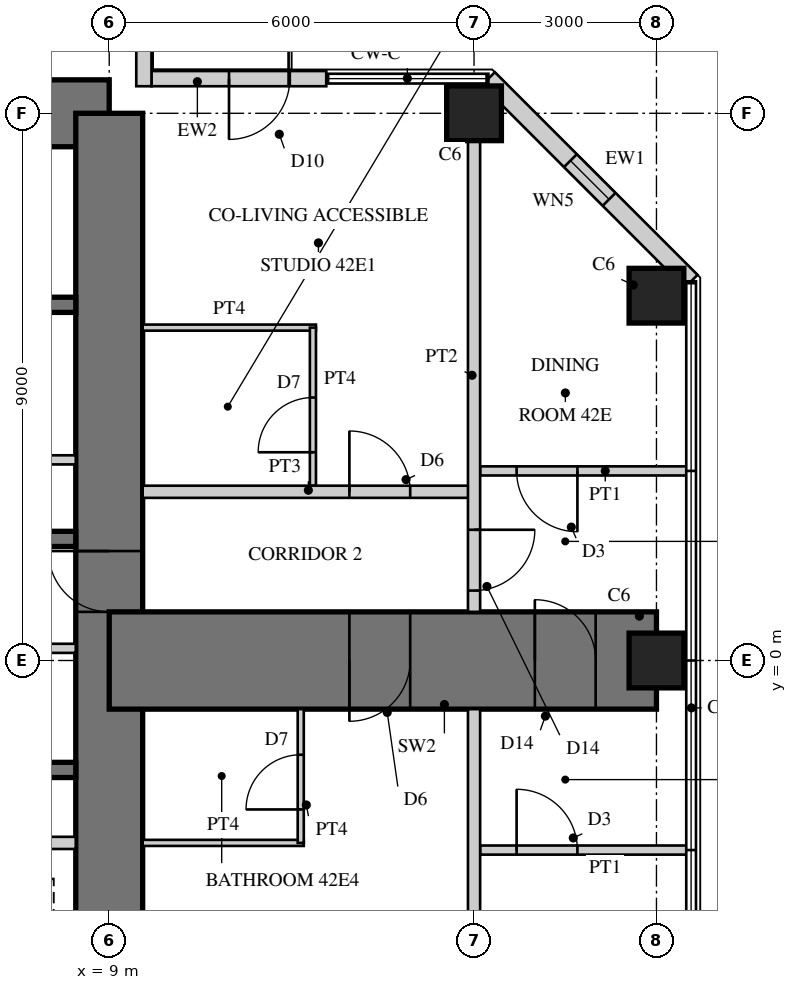
"""IFC4 building model, lengths in metres.
Left out: names, types, materials, properties, quantities, classifications, styles, units other than length and angle.
Written with IfcOpenShell. Run it as: python <this file> out.ifc"""

import sys

from ifc_helpers import new_model, si_unit, direction, frame, frame_2d, origin, origin_2d, place, context, subcontext, project, spatial, rectangle, hollow_rectangle, extrude, element, fill, save


model = new_model("IFC4")
c1 = context("Model", 3, precision=1e-05, world=origin(), true_north=direction((0.0, 1.0)))
c2 = subcontext(c1, "Body", "Model", "MODEL_VIEW")
j1 = project(units=[si_unit("LENGTHUNIT", "METRE"), si_unit("PLANEANGLEUNIT", "RADIAN")], contexts=[c1])
p1 = place(None, origin())
s1 = spatial("IfcSite", under=j1, at=p1, CompositionType="ELEMENT")
p2 = place(p1, origin())
s2 = spatial("IfcBuilding", under=s1, at=p2, CompositionType="ELEMENT")
p3 = place(p2, frame((0.0, 0.0, 172.9)))
s3 = spatial("IfcBuildingStorey", under=s2, at=p3, CompositionType="ELEMENT", Elevation=172.9)
p4 = place(p3, frame((9.0, 9.0, 0.0), z_axis=(0.0, 0.0, 1.0), x_axis=(-1.0, 0.0, 0.0)))
e1 = element("IfcWall", 1, at=p4, inside=s3, PredefinedType="SHEAR", context=c2, shape_type="SweptSolid", body=[
    extrude(rectangle(XDim=18.0, YDim=1.1, at=frame_2d((9.0, 0.0))), origin(), (0.0, 0.0, 1.0), 3.4),
])
p5 = place(p4, frame((9.8, 0.0, 0.0)))
e2 = element("IfcOpeningElement", 2, at=p5, cuts=e1, PredefinedType="OPENING", context=c2, shape_type="SweptSolid", body=[
    extrude(rectangle(XDim=1.0, YDim=2.4, at=frame_2d((0.5, 1.2))), frame((0.0, 0.56, 0.0), z_axis=(0.0, -1.0, 0.0), x_axis=(1.0, 0.0, 0.0)), (0.0, 0.0, 1.0), 1.12),
])
p6 = place(p3, frame((9.0, -9.0, 0.0), z_axis=(0.0, 0.0, 1.0), x_axis=(0.0, 1.0, 0.0)))
e3 = element("IfcWall", 3, at=p6, inside=s3, PredefinedType="SHEAR", context=c2, shape_type="SweptSolid", body=[
    extrude(rectangle(XDim=18.0, YDim=1.1, at=frame_2d((9.0, 0.0))), origin(), (0.0, 0.0, 1.0), 3.4),
])
p7 = place(p6, frame((9.8, 0.0, 0.0)))
e4 = element("IfcOpeningElement", 4, at=p7, cuts=e3, PredefinedType="OPENING", context=c2, shape_type="SweptSolid", body=[
    extrude(rectangle(XDim=1.0, YDim=2.4, at=frame_2d((0.5, 1.2))), frame((0.0, 0.56, 0.0), z_axis=(0.0, -1.0, 0.0), x_axis=(1.0, 0.0, 0.0)), (0.0, 0.0, 1.0), 1.12),
])
p8 = place(p3, frame((1.925, 2.0, 0.0), z_axis=(0.0, 0.0, 1.0), x_axis=(1.0, 0.0, 0.0)))
e5 = element("IfcWall", 5, at=p8, inside=s3, PredefinedType="SHEAR", context=c2, shape_type="SweptSolid", body=[
    extrude(rectangle(XDim=6.525, YDim=0.25, at=frame_2d((3.262, 0.0))), origin(), (0.0, 0.0, 1.0), 3.4),
])
p9 = place(p3, frame((1.925, 5.85, 0.0), z_axis=(0.0, 0.0, 1.0), x_axis=(1.0, 0.0, 0.0)))
e6 = element("IfcWall", 6, at=p9, inside=s3, PredefinedType="SHEAR", context=c2, shape_type="SweptSolid", body=[
    extrude(rectangle(XDim=6.525, YDim=0.25, at=frame_2d((3.262, 0.0))), origin(), (0.0, 0.0, 1.0), 3.4),
])
p10 = place(p9, frame((0.521, 0.0, 0.0)))
e7 = element("IfcOpeningElement", 7, at=p10, cuts=e6, PredefinedType="OPENING", context=c2, shape_type="SweptSolid", body=[
    extrude(rectangle(XDim=1.0, YDim=2.1, at=frame_2d((0.5, 1.05))), frame((0.0, 0.135, 0.0), z_axis=(0.0, -1.0, 0.0), x_axis=(1.0, 0.0, 0.0)), (0.0, 0.0, 1.0), 0.27),
])
p11 = place(p9, frame((2.762, 0.0, 0.0)))
e8 = element("IfcOpeningElement", 8, at=p11, cuts=e6, PredefinedType="OPENING", context=c2, shape_type="SweptSolid", body=[
    extrude(rectangle(XDim=1.0, YDim=2.1, at=frame_2d((0.5, 1.05))), frame((0.0, 0.135, 0.0), z_axis=(0.0, -1.0, 0.0), x_axis=(1.0, 0.0, 0.0)), (0.0, 0.0, 1.0), 0.27),
])
p12 = place(p3, frame((1.925, 3.3, 0.0), z_axis=(0.0, 0.0, 1.0), x_axis=(1.0, 0.0, 0.0)))
e9 = element("IfcWall", 9, at=p12, inside=s3, PredefinedType="PARTITIONING", context=c2, shape_type="SweptSolid", body=[
    extrude(rectangle(XDim=6.525, YDim=0.15, at=frame_2d((3.262, 0.0))), origin(), (0.0, 0.0, 1.0), 3.4),
])
p13 = place(p12, frame((0.075, 0.0, 0.0)))
e10 = element("IfcOpeningElement", 10, at=p13, cuts=e9, PredefinedType="OPENING", context=c2, shape_type="SweptSolid", body=[
    extrude(rectangle(XDim=0.8, YDim=2.1, at=frame_2d((0.4, 1.05))), frame((0.0, 0.085, 0.0), z_axis=(0.0, -1.0, 0.0), x_axis=(1.0, 0.0, 0.0)), (0.0, 0.0, 1.0), 0.17),
])
p14 = place(p12, frame((3.675, 0.0, 0.0)))
e11 = element("IfcOpeningElement", 11, at=p14, cuts=e9, PredefinedType="OPENING", context=c2, shape_type="SweptSolid", body=[
    extrude(rectangle(XDim=0.8, YDim=2.1, at=frame_2d((0.4, 1.05))), frame((0.0, 0.085, 0.0), z_axis=(0.0, -1.0, 0.0), x_axis=(1.0, 0.0, 0.0)), (0.0, 0.0, 1.0), 0.17),
])
p15 = place(p3, frame((2.125, -1.8, 0.0), z_axis=(0.0, 0.0, 1.0), x_axis=(1.0, 0.0, 0.0)))
e12 = element("IfcWall", 12, at=p15, inside=s3, PredefinedType="SHEAR", context=c2, shape_type="SweptSolid", body=[
    extrude(rectangle(XDim=6.325, YDim=0.25, at=frame_2d((3.163, 0.0))), origin(), (0.0, 0.0, 1.0), 3.4),
])
p16 = place(p3, frame((5.725, -3.0, 0.0), z_axis=(0.0, 0.0, 1.0), x_axis=(1.0, 0.0, 0.0)))
e13 = element("IfcWall", 13, at=p16, inside=s3, PredefinedType="PARTITIONING", context=c2, shape_type="SweptSolid", body=[
    extrude(rectangle(XDim=2.725, YDim=0.2, at=frame_2d((1.362, 0.0))), origin(), (0.0, 0.0, 1.0), 3.4),
])
p17 = place(p3, frame((9.0, 0.0, 0.0), z_axis=(0.0, 0.0, 1.0), x_axis=(1.0, 0.0, 0.0)))
e14 = element("IfcWall", 14, at=p17, inside=s3, PredefinedType="SHEAR", context=c2, shape_type="SweptSolid", body=[
    extrude(rectangle(XDim=9.0, YDim=1.6, at=frame_2d((4.5, 0.0))), origin(), (0.0, 0.0, 1.0), 3.4),
])
p18 = place(p17, frame((3.95, 0.0, 0.0)))
e15 = element("IfcOpeningElement", 15, at=p18, cuts=e14, PredefinedType="OPENING", context=c2, shape_type="SweptSolid", body=[
    extrude(rectangle(XDim=1.0, YDim=2.15, at=frame_2d((0.5, 1.075))), frame((0.0, 0.81, 0.0), z_axis=(0.0, -1.0, 0.0), x_axis=(1.0, 0.0, 0.0)), (0.0, 0.0, 1.0), 1.62),
])
p19 = place(p17, frame((7.0, 0.0, 0.0)))
e16 = element("IfcOpeningElement", 16, at=p19, cuts=e14, PredefinedType="OPENING", context=c2, shape_type="SweptSolid", body=[
    extrude(rectangle(XDim=1.0, YDim=2.2, at=frame_2d((0.5, 1.1))), frame((0.0, 0.81, 0.0), z_axis=(0.0, -1.0, 0.0), x_axis=(1.0, 0.0, 0.0)), (0.0, 0.0, 1.0), 1.62),
])
for number, where, z_axis, x_axis in (
    (17, (15.0, 9.0, 0.0), (0.0, 0.0, 1.0), (1.0, 0.0, 0.0)),
    (18, (18.0, 0.0, 0.0), (0.0, 0.0, 1.0), (1.0, 0.0, 0.0)),
    (19, (18.0, 6.0, 0.0), (0.0, 0.0, 1.0), (1.0, 0.0, 0.0)),
):
    element("IfcColumn", number, at=place(p3, frame(where, z_axis=z_axis, x_axis=x_axis)), inside=s3, PredefinedType="COLUMN", context=c2, shape_type="SweptSolid", body=[
        extrude(rectangle(XDim=0.9, YDim=0.9, at=origin_2d()), origin(), (0.0, 0.0, 1.0), 3.4),
    ])
p20 = place(p3, frame((18.57, 6.236, 0.0), z_axis=(0.0, 0.0, 1.0), x_axis=(-0.707106781187, 0.707106781187, 0.0)))
e20 = element("IfcWall", 20, at=p20, inside=s3, PredefinedType="SOLIDWALL", context=c2, shape_type="SweptSolid", body=[
    extrude(rectangle(XDim=4.715, YDim=0.3, at=frame_2d((2.357, 0.0))), origin(), (0.0, 0.0, 1.0), 3.22),
])
p21 = place(p20, frame((1.907, 0.0, 0.3)))
e21 = element("IfcOpeningElement", 21, at=p21, cuts=e20, PredefinedType="OPENING", context=c2, shape_type="SweptSolid", body=[
    extrude(rectangle(XDim=0.9, YDim=2.4, at=frame_2d((0.45, 1.2))), frame((0.0, 0.16, 0.0), z_axis=(0.0, -1.0, 0.0), x_axis=(1.0, 0.0, 0.0)), (0.0, 0.0, 1.0), 0.32),
])
p22 = place(p3, frame((12.57, 9.57, 0.0), z_axis=(0.0, 0.0, 1.0), x_axis=(-1.0, 0.0, 0.0)))
e22 = element("IfcWall", 22, at=p22, inside=s3, PredefinedType="SOLIDWALL", context=c2, shape_type="SweptSolid", body=[
    extrude(rectangle(XDim=2.875, YDim=0.25, at=frame_2d((1.438, 0.0))), origin(), (0.0, 0.0, 1.0), 3.22),
])
p23 = place(p22, frame((0.6, 0.0, 0.0)))
e23 = element("IfcOpeningElement", 23, at=p23, cuts=e22, PredefinedType="OPENING", context=c2, shape_type="SweptSolid", body=[
    extrude(rectangle(XDim=1.0, YDim=2.2, at=frame_2d((0.5, 1.1))), frame((0.0, 0.135, 0.0), z_axis=(0.0, -1.0, 0.0), x_axis=(1.0, 0.0, 0.0)), (0.0, 0.0, 1.0), 0.27),
])
p24 = place(p3, frame((9.57, 9.445, 0.0), z_axis=(0.0, 0.0, 1.0), x_axis=(0.0, 1.0, 0.0)))
e24 = element("IfcWall", 24, at=p24, inside=s3, PredefinedType="SOLIDWALL", context=c2, shape_type="SweptSolid", body=[
    extrude(rectangle(XDim=3.125, YDim=0.25, at=frame_2d((1.562, 0.0))), origin(), (0.0, 0.0, 1.0), 3.22),
])
p25 = place(p24, frame((0.6, 0.0, 0.0)))
e25 = element("IfcOpeningElement", 25, at=p25, cuts=e24, PredefinedType="OPENING", context=c2, shape_type="SweptSolid", body=[
    extrude(rectangle(XDim=1.0, YDim=2.2, at=frame_2d((0.5, 1.1))), frame((0.0, 0.135, 0.0), z_axis=(0.0, -1.0, 0.0), x_axis=(1.0, 0.0, 0.0)), (0.0, 0.0, 1.0), 0.27),
])
p26 = place(p3, frame((2.325, 0.2, 0.0), z_axis=(0.0, 0.0, 1.0), x_axis=(1.0, 0.0, 0.0)))
e26 = element("IfcWall", 26, at=p26, inside=s3, PredefinedType="PARTITIONING", context=c2, shape_type="SweptSolid", body=[
    extrude(rectangle(XDim=6.125, YDim=0.15, at=frame_2d((3.062, 0.0))), origin(), (0.0, 0.0, 1.0), 3.22),
])
p27 = place(p26, frame((0.4, 0.0, 0.0)))
e27 = element("IfcOpeningElement", 27, at=p27, cuts=e26, PredefinedType="OPENING", context=c2, shape_type="SweptSolid", body=[
    extrude(rectangle(XDim=1.0, YDim=2.1, at=frame_2d((0.5, 1.05))), frame((0.0, 0.085, 0.0), z_axis=(0.0, -1.0, 0.0), x_axis=(1.0, 0.0, 0.0)), (0.0, 0.0, 1.0), 0.17),
])
p28 = place(p3, frame((9.55, 5.475, 0.0), z_axis=(0.0, 0.0, 1.0), x_axis=(1.0, 0.0, 0.0)))
e28 = element("IfcWall", 28, at=p28, inside=s3, PredefinedType="PARTITIONING", context=c2, shape_type="SweptSolid", body=[
    extrude(rectangle(XDim=2.85, YDim=0.1, at=frame_2d((1.425, 0.0))), origin(), (0.0, 0.0, 1.0), 3.22),
])
p29 = place(p3, frame((12.35, 2.875, 0.0), z_axis=(0.0, 0.0, 1.0), x_axis=(0.0, 1.0, 0.0)))
e29 = element("IfcWall", 29, at=p29, inside=s3, PredefinedType="PARTITIONING", context=c2, shape_type="SweptSolid", body=[
    extrude(rectangle(XDim=2.6, YDim=0.1, at=frame_2d((1.3, 0.0))), origin(), (0.0, 0.0, 1.0), 3.22),
])
p30 = place(p29, frame((0.55, 0.0, 0.0)))
e30 = element("IfcOpeningElement", 30, at=p30, cuts=e29, PredefinedType="OPENING", context=c2, shape_type="SweptSolid", body=[
    extrude(rectangle(XDim=0.9, YDim=2.1, at=frame_2d((0.45, 1.05))), frame((0.0, 0.06, 0.0), z_axis=(0.0, -1.0, 0.0), x_axis=(1.0, 0.0, 0.0)), (0.0, 0.0, 1.0), 0.12),
])
p31 = place(p3, frame((9.55, -3.0, 0.0), z_axis=(0.0, 0.0, 1.0), x_axis=(1.0, 0.0, 0.0)))
e31 = element("IfcWall", 31, at=p31, inside=s3, PredefinedType="PARTITIONING", context=c2, shape_type="SweptSolid", body=[
    extrude(rectangle(XDim=2.65, YDim=0.1, at=frame_2d((1.325, 0.0))), origin(), (0.0, 0.0, 1.0), 3.22),
])
p32 = place(p3, frame((12.15, -3.0, 0.0), z_axis=(0.0, 0.0, 1.0), x_axis=(0.0, 1.0, 0.0)))
e32 = element("IfcWall", 32, at=p32, inside=s3, PredefinedType="PARTITIONING", context=c2, shape_type="SweptSolid", body=[
    extrude(rectangle(XDim=2.2, YDim=0.1, at=frame_2d((1.1, 0.0))), origin(), (0.0, 0.0, 1.0), 3.22),
])
p33 = place(p32, frame((0.55, 0.0, 0.0)))
e33 = element("IfcOpeningElement", 33, at=p33, cuts=e32, PredefinedType="OPENING", context=c2, shape_type="SweptSolid", body=[
    extrude(rectangle(XDim=0.9, YDim=2.1, at=frame_2d((0.45, 1.05))), frame((0.0, 0.06, 0.0), z_axis=(0.0, -1.0, 0.0), x_axis=(1.0, 0.0, 0.0)), (0.0, 0.0, 1.0), 0.12),
])
p34 = place(p3, frame((9.55, 2.775, 0.0), z_axis=(0.0, 0.0, 1.0), x_axis=(1.0, 0.0, 0.0)))
e34 = element("IfcWall", 34, at=p34, inside=s3, PredefinedType="SOLIDWALL", context=c2, shape_type="SweptSolid", body=[
    extrude(rectangle(XDim=5.45, YDim=0.2, at=frame_2d((2.725, 0.0))), origin(), (0.0, 0.0, 1.0), 3.22),
])
p35 = place(p34, frame((3.4, 0.0, 0.0)))
e35 = element("IfcOpeningElement", 35, at=p35, cuts=e34, PredefinedType="OPENING", context=c2, shape_type="SweptSolid", body=[
    extrude(rectangle(XDim=1.0, YDim=2.15, at=frame_2d((0.5, 1.075))), frame((0.0, 0.11, 0.0), z_axis=(0.0, -1.0, 0.0), x_axis=(1.0, 0.0, 0.0)), (0.0, 0.0, 1.0), 0.22),
])
p36 = place(p3, frame((15.1, 3.118, 0.0), z_axis=(0.0, 0.0, 1.0), x_axis=(1.0, 0.0, 0.0)))
e36 = element("IfcWall", 36, at=p36, inside=s3, PredefinedType="PARTITIONING", context=c2, shape_type="SweptSolid", body=[
    extrude(rectangle(XDim=3.43, YDim=0.15, at=frame_2d((1.715, 0.0))), origin(), (0.0, 0.0, 1.0), 3.22),
])
p37 = place(p36, frame((0.6, 0.0, 0.0)))
e37 = element("IfcOpeningElement", 37, at=p37, cuts=e36, PredefinedType="OPENING", context=c2, shape_type="SweptSolid", body=[
    extrude(rectangle(XDim=1.0, YDim=2.1, at=frame_2d((0.5, 1.05))), frame((0.0, 0.085, 0.0), z_axis=(0.0, -1.0, 0.0), x_axis=(1.0, 0.0, 0.0)), (0.0, 0.0, 1.0), 0.17),
])
p38 = place(p3, frame((15.1, -3.118, 0.0), z_axis=(0.0, 0.0, 1.0), x_axis=(1.0, 0.0, 0.0)))
e38 = element("IfcWall", 38, at=p38, inside=s3, PredefinedType="PARTITIONING", context=c2, shape_type="SweptSolid", body=[
    extrude(rectangle(XDim=3.43, YDim=0.15, at=frame_2d((1.715, 0.0))), origin(), (0.0, 0.0, 1.0), 3.22),
])
p39 = place(p38, frame((0.6, 0.0, 0.0)))
e39 = element("IfcOpeningElement", 39, at=p39, cuts=e38, PredefinedType="OPENING", context=c2, shape_type="SweptSolid", body=[
    extrude(rectangle(XDim=1.0, YDim=2.1, at=frame_2d((0.5, 1.05))), frame((0.0, 0.085, 0.0), z_axis=(0.0, -1.0, 0.0), x_axis=(1.0, 0.0, 0.0)), (0.0, 0.0, 1.0), 0.17),
])
p40 = place(p3, frame((15.0, -8.55, 0.0), z_axis=(0.0, 0.0, 1.0), x_axis=(0.0, 1.0, 0.0)))
e40 = element("IfcWall", 40, at=p40, inside=s3, PredefinedType="SOLIDWALL", context=c2, shape_type="SweptSolid", body=[
    extrude(rectangle(XDim=7.75, YDim=0.2, at=frame_2d((3.875, 0.0))), origin(), (0.0, 0.0, 1.0), 2.47),
])
p41 = place(p3, frame((15.0, 0.8, 0.0), z_axis=(0.0, 0.0, 1.0), x_axis=(0.0, 1.0, 0.0)))
e41 = element("IfcWall", 41, at=p41, inside=s3, PredefinedType="SOLIDWALL", context=c2, shape_type="SweptSolid", body=[
    extrude(rectangle(XDim=7.75, YDim=0.2, at=frame_2d((3.875, 0.0))), origin(), (0.0, 0.0, 1.0), 2.47),
])
p42 = place(p41, frame((0.35, 0.0, 0.0)))
e42 = element("IfcOpeningElement", 42, at=p42, cuts=e41, PredefinedType="OPENING", context=c2, shape_type="SweptSolid", body=[
    extrude(rectangle(XDim=1.0, YDim=2.2, at=frame_2d((0.5, 1.1))), frame((0.0, 0.11, 0.0), z_axis=(0.0, -1.0, 0.0), x_axis=(1.0, 0.0, 0.0)), (0.0, 0.0, 1.0), 0.22),
])
p43 = place(p21, origin())
e43 = element("IfcWindow", 43, at=p43, inside=s3, PartitioningType="SINGLE_PANEL", PredefinedType="WINDOW", context=c2, shape_type="SweptSolid", body=[
    extrude(hollow_rectangle(XDim=0.9, YDim=2.4, WallThickness=0.06, at=frame_2d((0.45, 1.2))), frame((0.0, 0.03, 0.0), z_axis=(0.0, -1.0, 0.0), x_axis=(1.0, 0.0, 0.0)), (0.0, 0.0, 1.0), 0.06),
    extrude(rectangle(XDim=0.779, YDim=2.279, at=frame_2d((0.45, 1.2))), frame((0.0, 0.03, 0.0), z_axis=(0.0, -1.0, 0.0), x_axis=(1.0, 0.0, 0.0)), (0.0, 0.0, 1.0), 0.06),
])
fill(e21, e43)
p44 = place(p23, origin())
e44 = element("IfcDoor", 44, at=p44, inside=s3, OperationType="SINGLE_SWING_RIGHT", PredefinedType="DOOR", context=c2, shape_type="SweptSolid", body=[
    extrude(hollow_rectangle(XDim=1.0, YDim=2.2, WallThickness=0.06, at=frame_2d((0.5, 1.1))), frame((0.0, 0.025, 0.0), z_axis=(0.0, -1.0, 0.0), x_axis=(1.0, 0.0, 0.0)), (0.0, 0.0, 1.0), 0.05),
    extrude(rectangle(XDim=0.879, YDim=2.079, at=frame_2d((0.5, 1.1))), frame((0.0, 0.025, 0.0), z_axis=(0.0, -1.0, 0.0), x_axis=(1.0, 0.0, 0.0)), (0.0, 0.0, 1.0), 0.05),
])
fill(e23, e44)
p45 = place(p30, origin())
e45 = element("IfcDoor", 45, at=p45, inside=s3, OperationType="SINGLE_SWING_LEFT", PredefinedType="DOOR", context=c2, shape_type="SweptSolid", body=[
    extrude(rectangle(XDim=0.9, YDim=2.1, at=frame_2d((0.45, 1.05))), frame((0.0, 0.025, 0.0), z_axis=(0.0, -1.0, 0.0), x_axis=(1.0, 0.0, 0.0)), (0.0, 0.0, 1.0), 0.05),
])
fill(e30, e45)
p46 = place(p33, origin())
e46 = element("IfcDoor", 46, at=p46, inside=s3, OperationType="SINGLE_SWING_LEFT", PredefinedType="DOOR", context=c2, shape_type="SweptSolid", body=[
    extrude(rectangle(XDim=0.9, YDim=2.1, at=frame_2d((0.45, 1.05))), frame((0.0, 0.025, 0.0), z_axis=(0.0, -1.0, 0.0), x_axis=(1.0, 0.0, 0.0)), (0.0, 0.0, 1.0), 0.05),
])
fill(e33, e46)
p47 = place(p35, origin())
e47 = element("IfcDoor", 47, at=p47, inside=s3, OperationType="SINGLE_SWING_LEFT", PredefinedType="DOOR", context=c2, shape_type="SweptSolid", body=[
    extrude(rectangle(XDim=1.0, YDim=2.15, at=frame_2d((0.5, 1.075))), frame((0.0, 0.025, 0.0), z_axis=(0.0, -1.0, 0.0), x_axis=(1.0, 0.0, 0.0)), (0.0, 0.0, 1.0), 0.05),
])
fill(e35, e47)
p48 = place(p37, frame((1.0, 0.0, 0.0), z_axis=(0.0, 0.0, 1.0), x_axis=(-1.0, 0.0, 0.0)))
e48 = element("IfcDoor", 48, at=p48, inside=s3, OperationType="SINGLE_SWING_LEFT", PredefinedType="DOOR", context=c2, shape_type="SweptSolid", body=[
    extrude(rectangle(XDim=1.0, YDim=2.1, at=frame_2d((0.5, 1.05))), frame((0.0, 0.025, 0.0), z_axis=(0.0, -1.0, 0.0), x_axis=(1.0, 0.0, 0.0)), (0.0, 0.0, 1.0), 0.05),
])
fill(e37, e48)
p49 = place(p39, origin())
e49 = element("IfcDoor", 49, at=p49, inside=s3, OperationType="SINGLE_SWING_LEFT", PredefinedType="DOOR", context=c2, shape_type="SweptSolid", body=[
    extrude(rectangle(XDim=1.0, YDim=2.1, at=frame_2d((0.5, 1.05))), frame((0.0, 0.025, 0.0), z_axis=(0.0, -1.0, 0.0), x_axis=(1.0, 0.0, 0.0)), (0.0, 0.0, 1.0), 0.05),
])
fill(e39, e49)
p50 = place(p42, frame((1.0, 0.0, 0.0), z_axis=(0.0, 0.0, 1.0), x_axis=(-1.0, 0.0, 0.0)))
e50 = element("IfcDoor", 50, at=p50, inside=s3, OperationType="SINGLE_SWING_LEFT", PredefinedType="DOOR", context=c2, shape_type="SweptSolid", body=[
    extrude(rectangle(XDim=1.0, YDim=2.2, at=frame_2d((0.5, 1.1))), frame((0.0, 0.025, 0.0), z_axis=(0.0, -1.0, 0.0), x_axis=(1.0, 0.0, 0.0)), (0.0, 0.0, 1.0), 0.05),
])
fill(e42, e50)
p51 = place(p18, frame((1.0, 0.0, 0.0), z_axis=(0.0, 0.0, 1.0), x_axis=(-1.0, 0.0, 0.0)))
e51 = element("IfcDoor", 51, at=p51, inside=s3, OperationType="SINGLE_SWING_RIGHT", PredefinedType="DOOR", context=c2, shape_type="SweptSolid", body=[
    extrude(rectangle(XDim=1.0, YDim=2.15, at=frame_2d((0.5, 1.075))), frame((0.0, 0.025, 0.0), z_axis=(0.0, -1.0, 0.0), x_axis=(1.0, 0.0, 0.0)), (0.0, 0.0, 1.0), 0.05),
])
fill(e15, e51)
p52 = place(p19, origin())
e52 = element("IfcDoor", 52, at=p52, inside=s3, OperationType="SINGLE_SWING_LEFT", PredefinedType="DOOR", context=c2, shape_type="SweptSolid", body=[
    extrude(rectangle(XDim=1.0, YDim=2.2, at=frame_2d((0.5, 1.1))), frame((0.0, 0.025, 0.0), z_axis=(0.0, -1.0, 0.0), x_axis=(1.0, 0.0, 0.0)), (0.0, 0.0, 1.0), 0.05),
])
fill(e16, e52)
p53 = place(p7, origin())
e53 = element("IfcDoor", 53, at=p53, inside=s3, OperationType="SINGLE_SWING_RIGHT", PredefinedType="DOOR", context=c2, shape_type="SweptSolid", body=[
    extrude(rectangle(XDim=1.0, YDim=2.4, at=frame_2d((0.5, 1.2))), frame((0.0, 0.055, 0.0), z_axis=(0.0, -1.0, 0.0), x_axis=(1.0, 0.0, 0.0)), (0.0, 0.0, 1.0), 0.05),
])
fill(e4, e53)
save(model, sys.argv[1])
